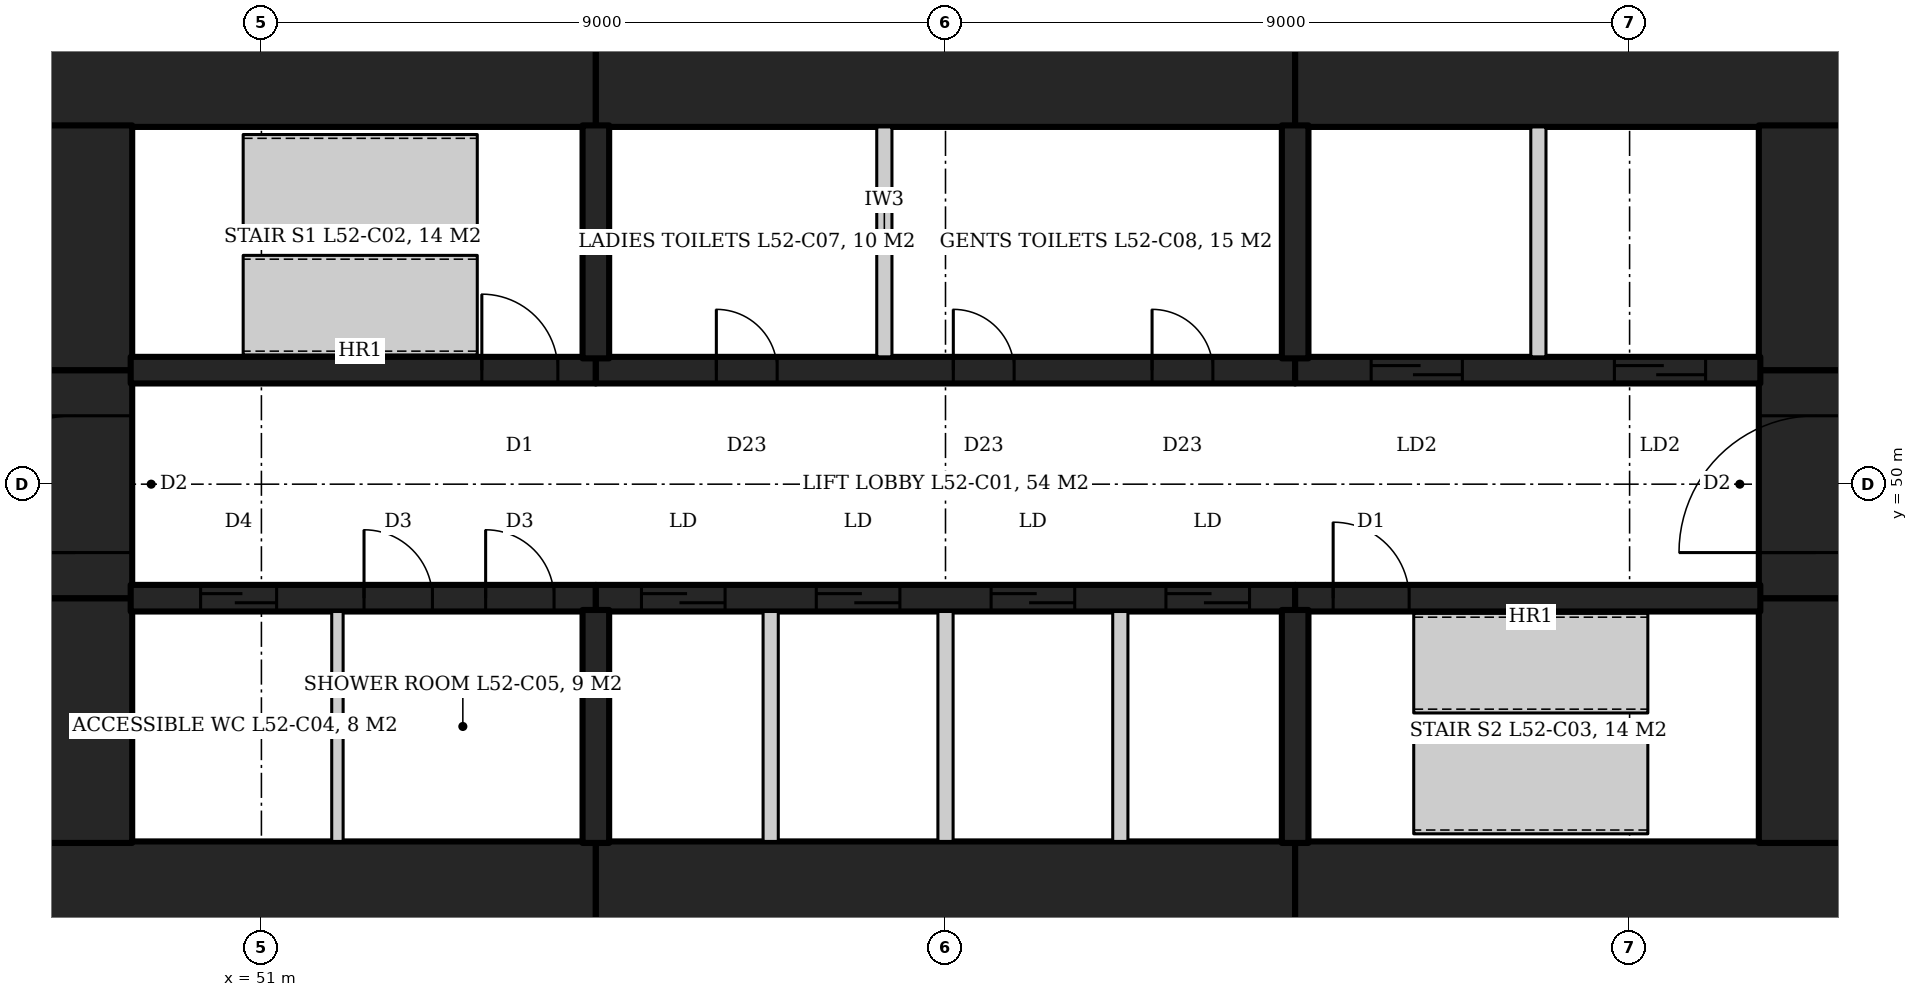
"""IFC4 building model, lengths in metres.
Left out: names, types, materials, properties, quantities, classifications, styles, units other than length and angle.
Written with IfcOpenShell. Run it as: python <this file> out.ifc"""

import sys

from ifc_helpers import new_model, si_unit, direction, frame, frame_2d, origin, place, context, subcontext, project, spatial, rectangle, extrude, element, fill, save


model = new_model("IFC4")
c1 = context("Model", 3, precision=1e-05, world=origin(), true_north=direction((0.0, 1.0)))
c2 = subcontext(c1, "Body", "Model", "MODEL_VIEW")
j1 = project(units=[si_unit("LENGTHUNIT", "METRE"), si_unit("PLANEANGLEUNIT", "RADIAN")], contexts=[c1])
p1 = place(None, origin())
s1 = spatial("IfcSite", under=j1, at=p1, CompositionType="ELEMENT")
p2 = place(p1, origin())
s2 = spatial("IfcBuilding", under=s1, at=p2, CompositionType="ELEMENT")
p3 = place(p2, frame((0.0, 0.0, 227.6)))
s3 = spatial("IfcBuildingStorey", under=s2, at=p3, CompositionType="ELEMENT", Elevation=227.6)
p4 = place(p3, frame((47.8, 55.45, 0.0), z_axis=(0.0, 0.0, 1.0), x_axis=(1.0, 0.0, 0.0)))
e1 = element("IfcWall", 1, at=p4, inside=s3, PredefinedType="SHEAR", context=c2, shape_type="SweptSolid", body=[
    extrude(rectangle(XDim=7.6, YDim=1.5, at=frame_2d((3.8, 0.0))), origin(), (0.0, 0.0, 1.0), 4.2),
])
p5 = place(p3, frame((55.4, 55.45, 0.0), z_axis=(0.0, 0.0, 1.0), x_axis=(1.0, 0.0, 0.0)))
e2 = element("IfcWall", 2, at=p5, inside=s3, PredefinedType="SHEAR", context=c2, shape_type="SweptSolid", body=[
    extrude(rectangle(XDim=9.2, YDim=1.5, at=frame_2d((4.6, 0.0))), origin(), (0.0, 0.0, 1.0), 4.2),
])
for number, where, z_axis, x_axis in (
    (3, (64.6, 55.45, 0.0), (0.0, 0.0, 1.0), (1.0, 0.0, 0.0)),
    (4, (47.8, 44.55, 0.0), (0.0, 0.0, 1.0), (1.0, 0.0, 0.0)),
):
    element("IfcWall", number, at=place(p3, frame(where, z_axis=z_axis, x_axis=x_axis)), inside=s3, PredefinedType="SHEAR", context=c2, shape_type="SweptSolid", body=[
        extrude(rectangle(XDim=7.6, YDim=1.5, at=frame_2d((3.8, 0.0))), origin(), (0.0, 0.0, 1.0), 4.2),
    ])
p6 = place(p3, frame((55.4, 44.55, 0.0), z_axis=(0.0, 0.0, 1.0), x_axis=(1.0, 0.0, 0.0)))
e5 = element("IfcWall", 5, at=p6, inside=s3, PredefinedType="SHEAR", context=c2, shape_type="SweptSolid", body=[
    extrude(rectangle(XDim=9.2, YDim=1.5, at=frame_2d((4.6, 0.0))), origin(), (0.0, 0.0, 1.0), 4.2),
])
p7 = place(p3, frame((64.6, 44.55, 0.0), z_axis=(0.0, 0.0, 1.0), x_axis=(1.0, 0.0, 0.0)))
e6 = element("IfcWall", 6, at=p7, inside=s3, PredefinedType="SHEAR", context=c2, shape_type="SweptSolid", body=[
    extrude(rectangle(XDim=7.6, YDim=1.5, at=frame_2d((3.8, 0.0))), origin(), (0.0, 0.0, 1.0), 4.2),
])
p8 = place(p3, frame((71.45, 45.28, 0.0), z_axis=(0.0, 0.0, 1.0), x_axis=(0.0, 1.0, 0.0)))
e7 = element("IfcWall", 7, at=p8, inside=s3, PredefinedType="SHEAR", context=c2, shape_type="SweptSolid", body=[
    extrude(rectangle(XDim=3.22, YDim=1.5, at=frame_2d((1.61, 0.0))), origin(), (0.0, 0.0, 1.0), 4.2),
])
p9 = place(p3, frame((71.45, 48.5, 0.0), z_axis=(0.0, 0.0, 1.0), x_axis=(0.0, 1.0, 0.0)))
e8 = element("IfcWall", 8, at=p9, inside=s3, PredefinedType="SHEAR", context=c2, shape_type="SweptSolid", body=[
    extrude(rectangle(XDim=3.0, YDim=1.5, at=frame_2d((1.5, 0.0))), origin(), (0.0, 0.0, 1.0), 4.2),
])
p10 = place(p9, frame((0.6, 0.0, 0.0)))
e9 = element("IfcOpeningElement", 9, at=p10, cuts=e8, PredefinedType="OPENING", context=c2, shape_type="SweptSolid", body=[
    extrude(rectangle(XDim=1.8, YDim=2.1, at=frame_2d((0.9, 1.05))), frame((0.0, 0.76, 0.0), z_axis=(0.0, -1.0, 0.0), x_axis=(1.0, 0.0, 0.0)), (0.0, 0.0, 1.0), 1.52),
])
for number, where, z_axis, x_axis in (
    (10, (71.45, 51.5, 0.0), (0.0, 0.0, 1.0), (0.0, 1.0, 0.0)),
    (11, (48.55, 45.28, 0.0), (0.0, 0.0, 1.0), (0.0, 1.0, 0.0)),
):
    element("IfcWall", number, at=place(p3, frame(where, z_axis=z_axis, x_axis=x_axis)), inside=s3, PredefinedType="SHEAR", context=c2, shape_type="SweptSolid", body=[
        extrude(rectangle(XDim=3.22, YDim=1.5, at=frame_2d((1.61, 0.0))), origin(), (0.0, 0.0, 1.0), 4.2),
    ])
p11 = place(p3, frame((48.55, 48.5, 0.0), z_axis=(0.0, 0.0, 1.0), x_axis=(0.0, 1.0, 0.0)))
e12 = element("IfcWall", 12, at=p11, inside=s3, PredefinedType="SHEAR", context=c2, shape_type="SweptSolid", body=[
    extrude(rectangle(XDim=3.0, YDim=1.5, at=frame_2d((1.5, 0.0))), origin(), (0.0, 0.0, 1.0), 4.2),
])
p12 = place(p11, frame((0.6, 0.0, 0.0)))
e13 = element("IfcOpeningElement", 13, at=p12, cuts=e12, PredefinedType="OPENING", context=c2, shape_type="SweptSolid", body=[
    extrude(rectangle(XDim=1.8, YDim=2.1, at=frame_2d((0.9, 1.05))), frame((0.0, 0.76, 0.0), z_axis=(0.0, -1.0, 0.0), x_axis=(1.0, 0.0, 0.0)), (0.0, 0.0, 1.0), 1.52),
])
p13 = place(p3, frame((48.55, 51.5, 0.0), z_axis=(0.0, 0.0, 1.0), x_axis=(0.0, 1.0, 0.0)))
e14 = element("IfcWall", 14, at=p13, inside=s3, PredefinedType="SHEAR", context=c2, shape_type="SweptSolid", body=[
    extrude(rectangle(XDim=3.22, YDim=1.5, at=frame_2d((1.61, 0.0))), origin(), (0.0, 0.0, 1.0), 4.2),
])
p14 = place(p3, frame((49.28, 51.5, 0.0), z_axis=(0.0, 0.0, 1.0), x_axis=(1.0, 0.0, 0.0)))
e15 = element("IfcWall", 15, at=p14, inside=s3, PredefinedType="SHEAR", context=c2, shape_type="SweptSolid", body=[
    extrude(rectangle(XDim=6.12, YDim=0.35, at=frame_2d((3.06, 0.0))), origin(), (0.0, 0.0, 1.0), 4.2),
])
p15 = place(p14, frame((4.62, 0.0, 0.0)))
e16 = element("IfcOpeningElement", 16, at=p15, cuts=e15, PredefinedType="OPENING", context=c2, shape_type="SweptSolid", body=[
    extrude(rectangle(XDim=1.0, YDim=2.1, at=frame_2d((0.5, 1.05))), frame((0.0, 0.185, 0.0), z_axis=(0.0, -1.0, 0.0), x_axis=(1.0, 0.0, 0.0)), (0.0, 0.0, 1.0), 0.37),
])
p16 = place(p3, frame((55.4, 51.5, 0.0), z_axis=(0.0, 0.0, 1.0), x_axis=(1.0, 0.0, 0.0)))
e17 = element("IfcWall", 17, at=p16, inside=s3, PredefinedType="SHEAR", context=c2, shape_type="SweptSolid", body=[
    extrude(rectangle(XDim=9.2, YDim=0.35, at=frame_2d((4.6, 0.0))), origin(), (0.0, 0.0, 1.0), 4.2),
])
p17 = place(p16, frame((1.585, 0.0, 0.0)))
e18 = element("IfcOpeningElement", 18, at=p17, cuts=e17, PredefinedType="OPENING", context=c2, shape_type="SweptSolid", body=[
    extrude(rectangle(XDim=0.8, YDim=2.1, at=frame_2d((0.4, 1.05))), frame((0.0, 0.185, 0.0), z_axis=(0.0, -1.0, 0.0), x_axis=(1.0, 0.0, 0.0)), (0.0, 0.0, 1.0), 0.37),
])
p18 = place(p16, frame((4.703, 0.0, 0.0)))
e19 = element("IfcOpeningElement", 19, at=p18, cuts=e17, PredefinedType="OPENING", context=c2, shape_type="SweptSolid", body=[
    extrude(rectangle(XDim=0.8, YDim=2.1, at=frame_2d((0.4, 1.05))), frame((0.0, 0.185, 0.0), z_axis=(0.0, -1.0, 0.0), x_axis=(1.0, 0.0, 0.0)), (0.0, 0.0, 1.0), 0.37),
])
p19 = place(p16, frame((7.318, 0.0, 0.0)))
e20 = element("IfcOpeningElement", 20, at=p19, cuts=e17, PredefinedType="OPENING", context=c2, shape_type="SweptSolid", body=[
    extrude(rectangle(XDim=0.8, YDim=2.1, at=frame_2d((0.4, 1.05))), frame((0.0, 0.185, 0.0), z_axis=(0.0, -1.0, 0.0), x_axis=(1.0, 0.0, 0.0)), (0.0, 0.0, 1.0), 0.37),
])
p20 = place(p3, frame((64.6, 51.5, 0.0), z_axis=(0.0, 0.0, 1.0), x_axis=(1.0, 0.0, 0.0)))
e21 = element("IfcWall", 21, at=p20, inside=s3, PredefinedType="SHEAR", context=c2, shape_type="SweptSolid", body=[
    extrude(rectangle(XDim=6.12, YDim=0.35, at=frame_2d((3.06, 0.0))), origin(), (0.0, 0.0, 1.0), 4.2),
])
p21 = place(p20, frame((1.0, 0.0, 0.0)))
e22 = element("IfcOpeningElement", 22, at=p21, cuts=e21, PredefinedType="OPENING", context=c2, shape_type="SweptSolid", body=[
    extrude(rectangle(XDim=1.2, YDim=2.1, at=frame_2d((0.6, 1.05))), frame((0.0, 0.185, 0.0), z_axis=(0.0, -1.0, 0.0), x_axis=(1.0, 0.0, 0.0)), (0.0, 0.0, 1.0), 0.37),
])
p22 = place(p20, frame((4.2, 0.0, 0.0)))
e23 = element("IfcOpeningElement", 23, at=p22, cuts=e21, PredefinedType="OPENING", context=c2, shape_type="SweptSolid", body=[
    extrude(rectangle(XDim=1.2, YDim=2.1, at=frame_2d((0.6, 1.05))), frame((0.0, 0.185, 0.0), z_axis=(0.0, -1.0, 0.0), x_axis=(1.0, 0.0, 0.0)), (0.0, 0.0, 1.0), 0.37),
])
p23 = place(p3, frame((49.28, 48.5, 0.0), z_axis=(0.0, 0.0, 1.0), x_axis=(1.0, 0.0, 0.0)))
e24 = element("IfcWall", 24, at=p23, inside=s3, PredefinedType="SHEAR", context=c2, shape_type="SweptSolid", body=[
    extrude(rectangle(XDim=6.12, YDim=0.35, at=frame_2d((3.06, 0.0))), origin(), (0.0, 0.0, 1.0), 4.2),
])
p24 = place(p23, frame((0.92, 0.0, 0.0)))
e25 = element("IfcOpeningElement", 25, at=p24, cuts=e24, PredefinedType="OPENING", context=c2, shape_type="SweptSolid", body=[
    extrude(rectangle(XDim=1.0, YDim=2.1, at=frame_2d((0.5, 1.05))), frame((0.0, 0.185, 0.0), z_axis=(0.0, -1.0, 0.0), x_axis=(1.0, 0.0, 0.0)), (0.0, 0.0, 1.0), 0.37),
])
p25 = place(p23, frame((3.07, 0.0, 0.0)))
e26 = element("IfcOpeningElement", 26, at=p25, cuts=e24, PredefinedType="OPENING", context=c2, shape_type="SweptSolid", body=[
    extrude(rectangle(XDim=0.9, YDim=2.1, at=frame_2d((0.45, 1.05))), frame((0.0, 0.185, 0.0), z_axis=(0.0, -1.0, 0.0), x_axis=(1.0, 0.0, 0.0)), (0.0, 0.0, 1.0), 0.37),
])
p26 = place(p23, frame((4.67, 0.0, 0.0)))
e27 = element("IfcOpeningElement", 27, at=p26, cuts=e24, PredefinedType="OPENING", context=c2, shape_type="SweptSolid", body=[
    extrude(rectangle(XDim=0.9, YDim=2.1, at=frame_2d((0.45, 1.05))), frame((0.0, 0.185, 0.0), z_axis=(0.0, -1.0, 0.0), x_axis=(1.0, 0.0, 0.0)), (0.0, 0.0, 1.0), 0.37),
])
p27 = place(p3, frame((55.4, 48.5, 0.0), z_axis=(0.0, 0.0, 1.0), x_axis=(1.0, 0.0, 0.0)))
e28 = element("IfcWall", 28, at=p27, inside=s3, PredefinedType="SHEAR", context=c2, shape_type="SweptSolid", body=[
    extrude(rectangle(XDim=9.2, YDim=0.35, at=frame_2d((4.6, 0.0))), origin(), (0.0, 0.0, 1.0), 4.2),
])
p28 = place(p27, frame((0.6, 0.0, 0.0)))
e29 = element("IfcOpeningElement", 29, at=p28, cuts=e28, PredefinedType="OPENING", context=c2, shape_type="SweptSolid", body=[
    extrude(rectangle(XDim=1.1, YDim=2.1, at=frame_2d((0.55, 1.05))), frame((0.0, 0.185, 0.0), z_axis=(0.0, -1.0, 0.0), x_axis=(1.0, 0.0, 0.0)), (0.0, 0.0, 1.0), 0.37),
])
p29 = place(p27, frame((2.9, 0.0, 0.0)))
e30 = element("IfcOpeningElement", 30, at=p29, cuts=e28, PredefinedType="OPENING", context=c2, shape_type="SweptSolid", body=[
    extrude(rectangle(XDim=1.1, YDim=2.1, at=frame_2d((0.55, 1.05))), frame((0.0, 0.185, 0.0), z_axis=(0.0, -1.0, 0.0), x_axis=(1.0, 0.0, 0.0)), (0.0, 0.0, 1.0), 0.37),
])
p30 = place(p27, frame((5.2, 0.0, 0.0)))
e31 = element("IfcOpeningElement", 31, at=p30, cuts=e28, PredefinedType="OPENING", context=c2, shape_type="SweptSolid", body=[
    extrude(rectangle(XDim=1.1, YDim=2.1, at=frame_2d((0.55, 1.05))), frame((0.0, 0.185, 0.0), z_axis=(0.0, -1.0, 0.0), x_axis=(1.0, 0.0, 0.0)), (0.0, 0.0, 1.0), 0.37),
])
p31 = place(p27, frame((7.5, 0.0, 0.0)))
e32 = element("IfcOpeningElement", 32, at=p31, cuts=e28, PredefinedType="OPENING", context=c2, shape_type="SweptSolid", body=[
    extrude(rectangle(XDim=1.1, YDim=2.1, at=frame_2d((0.55, 1.05))), frame((0.0, 0.185, 0.0), z_axis=(0.0, -1.0, 0.0), x_axis=(1.0, 0.0, 0.0)), (0.0, 0.0, 1.0), 0.37),
])
p32 = place(p3, frame((64.6, 48.5, 0.0), z_axis=(0.0, 0.0, 1.0), x_axis=(1.0, 0.0, 0.0)))
e33 = element("IfcWall", 33, at=p32, inside=s3, PredefinedType="SHEAR", context=c2, shape_type="SweptSolid", body=[
    extrude(rectangle(XDim=6.12, YDim=0.35, at=frame_2d((3.06, 0.0))), origin(), (0.0, 0.0, 1.0), 4.2),
])
p33 = place(p32, frame((0.5, 0.0, 0.0)))
e34 = element("IfcOpeningElement", 34, at=p33, cuts=e33, PredefinedType="OPENING", context=c2, shape_type="SweptSolid", body=[
    extrude(rectangle(XDim=1.0, YDim=2.1, at=frame_2d((0.5, 1.05))), frame((0.0, 0.185, 0.0), z_axis=(0.0, -1.0, 0.0), x_axis=(1.0, 0.0, 0.0)), (0.0, 0.0, 1.0), 0.37),
])
for number, where, z_axis, x_axis in (
    (35, (55.4, 51.655, 0.0), (0.0, 0.0, 1.0), (0.0, 1.0, 0.0)),
    (36, (64.6, 51.655, 0.0), (0.0, 0.0, 1.0), (0.0, 1.0, 0.0)),
    (37, (55.4, 48.345, 0.0), (0.0, 0.0, 1.0), (0.0, -1.0, 0.0)),
    (38, (64.6, 48.345, 0.0), (0.0, 0.0, 1.0), (0.0, -1.0, 0.0)),
):
    element("IfcWall", number, at=place(p3, frame(where, z_axis=z_axis, x_axis=x_axis)), inside=s3, PredefinedType="SHEAR", context=c2, shape_type="SweptSolid", body=[
        extrude(rectangle(XDim=3.065, YDim=0.35, at=frame_2d((1.532, 0.0))), origin(), (0.0, 0.0, 1.0), 4.2),
    ])
for number, where, z_axis, x_axis in (
    (39, (57.7, 45.3, 0.0), (0.0, 0.0, 1.0), (0.0, 1.0, 0.0)),
    (40, (60.0, 45.3, 0.0), (0.0, 0.0, 1.0), (0.0, 1.0, 0.0)),
    (41, (62.3, 45.3, 0.0), (0.0, 0.0, 1.0), (0.0, 1.0, 0.0)),
    (42, (67.8, 51.675, 0.0), (0.0, 0.0, 1.0), (0.0, 1.0, 0.0)),
):
    element("IfcWall", number, at=place(p3, frame(where, z_axis=z_axis, x_axis=x_axis)), inside=s3, PredefinedType="PARTITIONING", context=c2, shape_type="SweptSolid", body=[
        extrude(rectangle(XDim=3.025, YDim=0.2, at=frame_2d((1.512, 0.0))), origin(), (0.0, 0.0, 1.0), 4.2),
    ])
p34 = place(p3, frame((52.0, 45.3, 0.0), z_axis=(0.0, 0.0, 1.0), x_axis=(0.0, 1.0, 0.0)))
e43 = element("IfcWall", 43, at=p34, inside=s3, PredefinedType="PARTITIONING", context=c2, shape_type="SweptSolid", body=[
    extrude(rectangle(XDim=3.025, YDim=0.15, at=frame_2d((1.512, 0.0))), origin(), (0.0, 0.0, 1.0), 4.04),
])
p35 = place(p3, frame((59.196, 51.675, 0.0), z_axis=(0.0, 0.0, 1.0), x_axis=(0.0, 1.0, 0.0)))
e44 = element("IfcWall", 44, at=p35, inside=s3, PredefinedType="PARTITIONING", context=c2, shape_type="SweptSolid", body=[
    extrude(rectangle(XDim=3.025, YDim=0.2, at=frame_2d((1.512, 0.0))), origin(), (0.0, 0.0, 1.0), 4.04),
])
p36 = place(p15, origin())
e45 = element("IfcDoor", 45, at=p36, inside=s3, OperationType="SINGLE_SWING_LEFT", PredefinedType="DOOR", context=c2, shape_type="SweptSolid", body=[
    extrude(rectangle(XDim=1.0, YDim=2.1, at=frame_2d((0.5, 1.05))), frame((0.0, 0.025, 0.0), z_axis=(0.0, -1.0, 0.0), x_axis=(1.0, 0.0, 0.0)), (0.0, 0.0, 1.0), 0.05),
])
fill(e16, e45)
p37 = place(p33, origin())
e46 = element("IfcDoor", 46, at=p37, inside=s3, OperationType="SINGLE_SWING_LEFT", PredefinedType="DOOR", context=c2, shape_type="SweptSolid", body=[
    extrude(rectangle(XDim=1.0, YDim=2.1, at=frame_2d((0.5, 1.05))), frame((0.0, 0.025, 0.0), z_axis=(0.0, -1.0, 0.0), x_axis=(1.0, 0.0, 0.0)), (0.0, 0.0, 1.0), 0.05),
])
fill(e34, e46)
p38 = place(p21, origin())
e47 = element("IfcDoor", 47, at=p38, inside=s3, OperationType="SLIDING_TO_LEFT", PredefinedType="DOOR", context=c2, shape_type="SweptSolid", body=[
    extrude(rectangle(XDim=1.2, YDim=2.1, at=frame_2d((0.6, 1.05))), frame((0.0, 0.025, 0.0), z_axis=(0.0, -1.0, 0.0), x_axis=(1.0, 0.0, 0.0)), (0.0, 0.0, 1.0), 0.05),
])
fill(e22, e47)
p39 = place(p22, origin())
e48 = element("IfcDoor", 48, at=p39, inside=s3, OperationType="SLIDING_TO_LEFT", PredefinedType="DOOR", context=c2, shape_type="SweptSolid", body=[
    extrude(rectangle(XDim=1.2, YDim=2.1, at=frame_2d((0.6, 1.05))), frame((0.0, 0.025, 0.0), z_axis=(0.0, -1.0, 0.0), x_axis=(1.0, 0.0, 0.0)), (0.0, 0.0, 1.0), 0.05),
])
fill(e23, e48)
p40 = place(p28, origin())
e49 = element("IfcDoor", 49, at=p40, inside=s3, OperationType="SLIDING_TO_LEFT", PredefinedType="DOOR", context=c2, shape_type="SweptSolid", body=[
    extrude(rectangle(XDim=1.1, YDim=2.1, at=frame_2d((0.55, 1.05))), frame((0.0, 0.025, 0.0), z_axis=(0.0, -1.0, 0.0), x_axis=(1.0, 0.0, 0.0)), (0.0, 0.0, 1.0), 0.05),
])
fill(e29, e49)
p41 = place(p29, origin())
e50 = element("IfcDoor", 50, at=p41, inside=s3, OperationType="SLIDING_TO_LEFT", PredefinedType="DOOR", context=c2, shape_type="SweptSolid", body=[
    extrude(rectangle(XDim=1.1, YDim=2.1, at=frame_2d((0.55, 1.05))), frame((0.0, 0.025, 0.0), z_axis=(0.0, -1.0, 0.0), x_axis=(1.0, 0.0, 0.0)), (0.0, 0.0, 1.0), 0.05),
])
fill(e30, e50)
p42 = place(p30, origin())
e51 = element("IfcDoor", 51, at=p42, inside=s3, OperationType="SLIDING_TO_LEFT", PredefinedType="DOOR", context=c2, shape_type="SweptSolid", body=[
    extrude(rectangle(XDim=1.1, YDim=2.1, at=frame_2d((0.55, 1.05))), frame((0.0, 0.025, 0.0), z_axis=(0.0, -1.0, 0.0), x_axis=(1.0, 0.0, 0.0)), (0.0, 0.0, 1.0), 0.05),
])
fill(e31, e51)
p43 = place(p31, origin())
e52 = element("IfcDoor", 52, at=p43, inside=s3, OperationType="SLIDING_TO_LEFT", PredefinedType="DOOR", context=c2, shape_type="SweptSolid", body=[
    extrude(rectangle(XDim=1.1, YDim=2.1, at=frame_2d((0.55, 1.05))), frame((0.0, 0.025, 0.0), z_axis=(0.0, -1.0, 0.0), x_axis=(1.0, 0.0, 0.0)), (0.0, 0.0, 1.0), 0.05),
])
fill(e32, e52)
p44 = place(p24, origin())
e53 = element("IfcDoor", 53, at=p44, inside=s3, OperationType="SLIDING_TO_LEFT", PredefinedType="DOOR", context=c2, shape_type="SweptSolid", body=[
    extrude(rectangle(XDim=1.0, YDim=2.1, at=frame_2d((0.5, 1.05))), frame((0.0, 0.025, 0.0), z_axis=(0.0, -1.0, 0.0), x_axis=(1.0, 0.0, 0.0)), (0.0, 0.0, 1.0), 0.05),
])
fill(e25, e53)
p45 = place(p25, origin())
e54 = element("IfcDoor", 54, at=p45, inside=s3, OperationType="SINGLE_SWING_RIGHT", PredefinedType="DOOR", context=c2, shape_type="SweptSolid", body=[
    extrude(rectangle(XDim=0.9, YDim=2.1, at=frame_2d((0.45, 1.05))), frame((0.0, 0.025, 0.0), z_axis=(0.0, -1.0, 0.0), x_axis=(1.0, 0.0, 0.0)), (0.0, 0.0, 1.0), 0.05),
])
fill(e26, e54)
p46 = place(p26, origin())
e55 = element("IfcDoor", 55, at=p46, inside=s3, OperationType="SINGLE_SWING_RIGHT", PredefinedType="DOOR", context=c2, shape_type="SweptSolid", body=[
    extrude(rectangle(XDim=0.9, YDim=2.1, at=frame_2d((0.45, 1.05))), frame((0.0, 0.025, 0.0), z_axis=(0.0, -1.0, 0.0), x_axis=(1.0, 0.0, 0.0)), (0.0, 0.0, 1.0), 0.05),
])
fill(e27, e55)
p47 = place(p10, origin())
e56 = element("IfcDoor", 56, at=p47, inside=s3, OperationType="DOUBLE_DOOR_DOUBLE_SWING", PredefinedType="DOOR", context=c2, shape_type="SweptSolid", body=[
    extrude(rectangle(XDim=1.8, YDim=2.1, at=frame_2d((0.9, 1.05))), frame((0.0, 0.025, 0.0), z_axis=(0.0, -1.0, 0.0), x_axis=(1.0, 0.0, 0.0)), (0.0, 0.0, 1.0), 0.05),
])
fill(e9, e56)
p48 = place(p12, origin())
e57 = element("IfcDoor", 57, at=p48, inside=s3, OperationType="DOUBLE_DOOR_DOUBLE_SWING", PredefinedType="DOOR", context=c2, shape_type="SweptSolid", body=[
    extrude(rectangle(XDim=1.8, YDim=2.1, at=frame_2d((0.9, 1.05))), frame((0.0, 0.025, 0.0), z_axis=(0.0, -1.0, 0.0), x_axis=(1.0, 0.0, 0.0)), (0.0, 0.0, 1.0), 0.05),
])
fill(e13, e57)
p49 = place(p17, origin())
e58 = element("IfcDoor", 58, at=p49, inside=s3, OperationType="SINGLE_SWING_LEFT", PredefinedType="DOOR", context=c2, shape_type="SweptSolid", body=[
    extrude(rectangle(XDim=0.8, YDim=2.1, at=frame_2d((0.4, 1.05))), frame((0.0, 0.025, 0.0), z_axis=(0.0, -1.0, 0.0), x_axis=(1.0, 0.0, 0.0)), (0.0, 0.0, 1.0), 0.05),
])
fill(e18, e58)
p50 = place(p18, origin())
e59 = element("IfcDoor", 59, at=p50, inside=s3, OperationType="SINGLE_SWING_LEFT", PredefinedType="DOOR", context=c2, shape_type="SweptSolid", body=[
    extrude(rectangle(XDim=0.8, YDim=2.1, at=frame_2d((0.4, 1.05))), frame((0.0, 0.025, 0.0), z_axis=(0.0, -1.0, 0.0), x_axis=(1.0, 0.0, 0.0)), (0.0, 0.0, 1.0), 0.05),
])
fill(e19, e59)
p51 = place(p19, origin())
e60 = element("IfcDoor", 60, at=p51, inside=s3, OperationType="SINGLE_SWING_LEFT", PredefinedType="DOOR", context=c2, shape_type="SweptSolid", body=[
    extrude(rectangle(XDim=0.8, YDim=2.1, at=frame_2d((0.4, 1.05))), frame((0.0, 0.025, 0.0), z_axis=(0.0, -1.0, 0.0), x_axis=(1.0, 0.0, 0.0)), (0.0, 0.0, 1.0), 0.05),
])
fill(e20, e60)
save(model, sys.argv[1])
